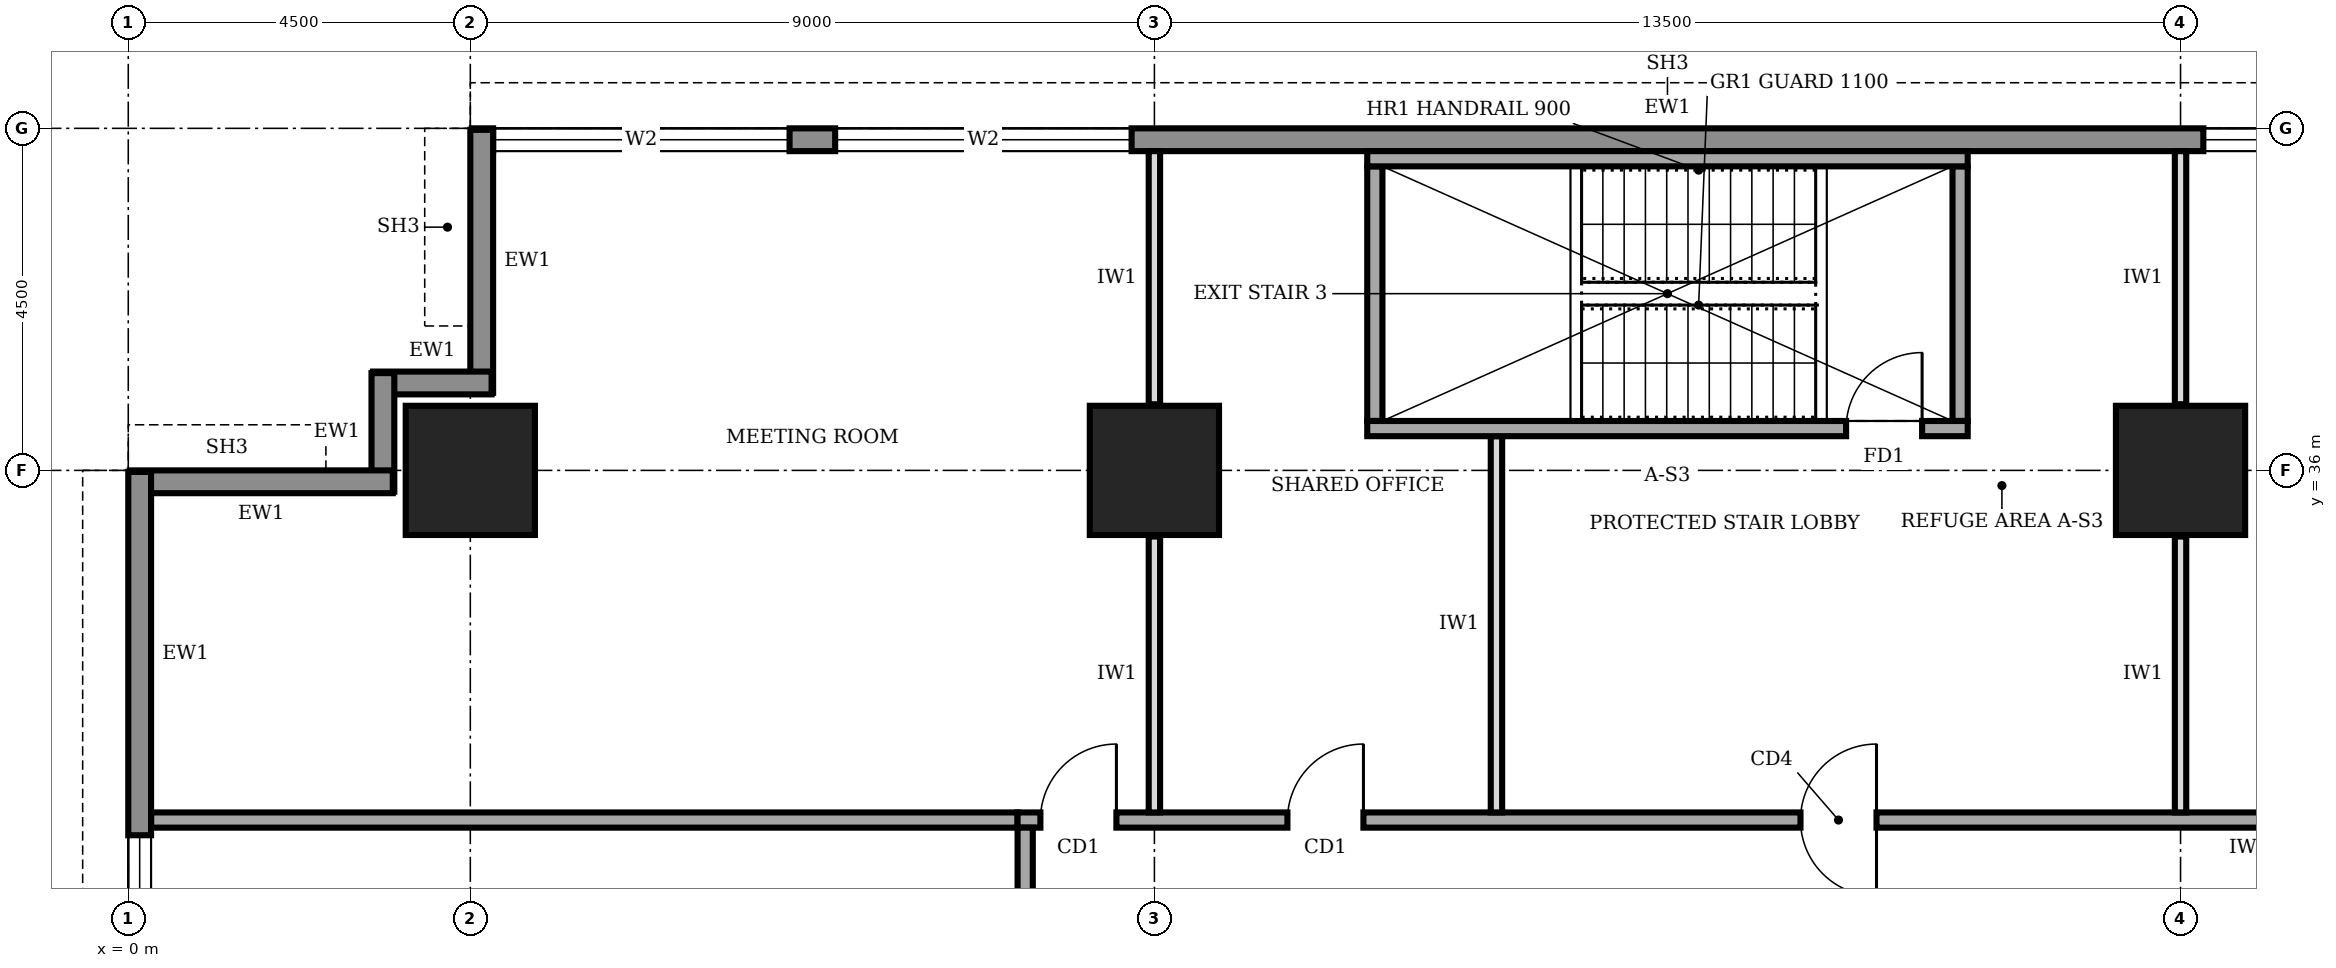
"""IFC4 building model, lengths in metres.
Left out: names, types, materials, properties, quantities, classifications, styles, units other than length and angle.
Written with IfcOpenShell. Run it as: python <this file> out.ifc"""

import sys

from ifc_helpers import new_model, si_unit, direction, frame, frame_2d, origin, origin_2d, place, context, subcontext, project, spatial, rectangle, extrude, element, fill, save


model = new_model("IFC4")
c1 = context("Model", 3, precision=1e-05, world=origin(), true_north=direction((0.0, 1.0)))
c2 = subcontext(c1, "Body", "Model", "MODEL_VIEW")
j1 = project(units=[si_unit("LENGTHUNIT", "METRE"), si_unit("PLANEANGLEUNIT", "RADIAN")], contexts=[c1])
p1 = place(None, origin())
s1 = spatial("IfcSite", under=j1, at=p1, CompositionType="ELEMENT")
p2 = place(p1, origin())
s2 = spatial("IfcBuilding", under=s1, at=p2, CompositionType="ELEMENT")
p3 = place(p2, frame((0.0, 0.0, 141.0)))
s3 = spatial("IfcBuildingStorey", under=s2, at=p3, CompositionType="ELEMENT", Elevation=141.0)
for number, where, z_axis, x_axis in (
    (1, (4.5, 36.0, 0.0), (0.0, 0.0, 1.0), (1.0, 0.0, 0.0)),
    (2, (13.5, 36.0, 0.0), (0.0, 0.0, 1.0), (1.0, 0.0, 0.0)),
    (3, (27.0, 36.0, 0.0), (0.0, 0.0, 1.0), (1.0, 0.0, 0.0)),
):
    element("IfcColumn", number, at=place(p3, frame(where, z_axis=z_axis, x_axis=x_axis)), inside=s3, PredefinedType="COLUMN", context=c2, shape_type="SweptSolid", body=[
        extrude(rectangle(XDim=1.7, YDim=1.7, at=origin_2d()), origin(), (0.0, 0.0, 1.0), 4.0),
    ])
p4 = place(p3, frame((35.98, 40.35, 0.0), z_axis=(0.0, 0.0, 1.0), x_axis=(-1.0, 0.0, 0.0)))
e4 = element("IfcWall", 4, at=p4, inside=s3, PredefinedType="STANDARD", context=c2, shape_type="SweptSolid", body=[
    extrude(rectangle(XDim=31.46, YDim=0.3, at=frame_2d((15.73, 0.0))), origin(), (0.0, 0.0, 1.0), 3.75),
])
p5 = place(p4, frame((27.28, 0.0, 0.6)))
e5 = element("IfcOpeningElement", 5, at=p5, cuts=e4, PredefinedType="OPENING", context=c2, shape_type="SweptSolid", body=[
    extrude(rectangle(XDim=3.9, YDim=2.6, at=frame_2d((1.95, 1.3))), frame((0.0, 0.16, 0.0), z_axis=(0.0, -1.0, 0.0), x_axis=(1.0, 0.0, 0.0)), (0.0, 0.0, 1.0), 0.32),
])
p6 = place(p4, frame((22.78, 0.0, 0.6)))
e6 = element("IfcOpeningElement", 6, at=p6, cuts=e4, PredefinedType="OPENING", context=c2, shape_type="SweptSolid", body=[
    extrude(rectangle(XDim=3.9, YDim=2.6, at=frame_2d((1.95, 1.3))), frame((0.0, 0.16, 0.0), z_axis=(0.0, -1.0, 0.0), x_axis=(1.0, 0.0, 0.0)), (0.0, 0.0, 1.0), 0.32),
])
p7 = place(p4, frame((4.78, 0.0, 0.6)))
e7 = element("IfcOpeningElement", 7, at=p7, cuts=e4, PredefinedType="OPENING", context=c2, shape_type="SweptSolid", body=[
    extrude(rectangle(XDim=3.9, YDim=2.6, at=frame_2d((1.95, 1.3))), frame((0.0, 0.16, 0.0), z_axis=(0.0, -1.0, 0.0), x_axis=(1.0, 0.0, 0.0)), (0.0, 0.0, 1.0), 0.32),
])
p8 = place(p3, frame((4.65, 40.48, 0.0), z_axis=(0.0, 0.0, 1.0), x_axis=(0.0, -1.0, 0.0)))
e8 = element("IfcWall", 8, at=p8, inside=s3, PredefinedType="STANDARD", context=c2, shape_type="SweptSolid", body=[
    extrude(rectangle(XDim=3.46, YDim=0.3, at=frame_2d((1.73, 0.0))), origin(), (0.0, 0.0, 1.0), 2.85),
])
for number, where, z_axis, x_axis in (
    (9, (4.78, 37.15, 0.0), (0.0, 0.0, 1.0), (-1.0, 0.0, 0.0)),
    (10, (3.35, 37.28, 0.0), (0.0, 0.0, 1.0), (0.0, -1.0, 0.0)),
):
    element("IfcWall", number, at=place(p3, frame(where, z_axis=z_axis, x_axis=x_axis)), inside=s3, PredefinedType="STANDARD", context=c2, shape_type="SweptSolid", body=[
        extrude(rectangle(XDim=1.56, YDim=0.3, at=frame_2d((0.78, 0.0))), origin(), (0.0, 0.0, 1.0), 3.75),
    ])
p9 = place(p3, frame((3.48, 35.85, 0.0), z_axis=(0.0, 0.0, 1.0), x_axis=(-1.0, 0.0, 0.0)))
e11 = element("IfcWall", 11, at=p9, inside=s3, PredefinedType="STANDARD", context=c2, shape_type="SweptSolid", body=[
    extrude(rectangle(XDim=3.46, YDim=0.3, at=frame_2d((1.73, 0.0))), origin(), (0.0, 0.0, 1.0), 2.85),
])
p10 = place(p3, frame((0.15, 35.98, 0.0), z_axis=(0.0, 0.0, 1.0), x_axis=(0.0, -1.0, 0.0)))
e12 = element("IfcWall", 12, at=p10, inside=s3, PredefinedType="STANDARD", context=c2, shape_type="SweptSolid", body=[
    extrude(rectangle(XDim=31.46, YDim=0.3, at=frame_2d((15.73, 0.0))), origin(), (0.0, 0.0, 1.0), 3.75),
])
p11 = place(p10, frame((27.28, 0.0, 0.6)))
e13 = element("IfcOpeningElement", 13, at=p11, cuts=e12, PredefinedType="OPENING", context=c2, shape_type="SweptSolid", body=[
    extrude(rectangle(XDim=3.9, YDim=2.6, at=frame_2d((1.95, 1.3))), frame((0.0, 0.16, 0.0), z_axis=(0.0, -1.0, 0.0), x_axis=(1.0, 0.0, 0.0)), (0.0, 0.0, 1.0), 0.32),
])
p12 = place(p10, frame((22.78, 0.0, 0.6)))
e14 = element("IfcOpeningElement", 14, at=p12, cuts=e12, PredefinedType="OPENING", context=c2, shape_type="SweptSolid", body=[
    extrude(rectangle(XDim=3.9, YDim=2.6, at=frame_2d((1.95, 1.3))), frame((0.0, 0.16, 0.0), z_axis=(0.0, -1.0, 0.0), x_axis=(1.0, 0.0, 0.0)), (0.0, 0.0, 1.0), 0.32),
])
p13 = place(p10, frame((18.28, 0.0, 0.6)))
e15 = element("IfcOpeningElement", 15, at=p13, cuts=e12, PredefinedType="OPENING", context=c2, shape_type="SweptSolid", body=[
    extrude(rectangle(XDim=3.9, YDim=2.6, at=frame_2d((1.95, 1.3))), frame((0.0, 0.16, 0.0), z_axis=(0.0, -1.0, 0.0), x_axis=(1.0, 0.0, 0.0)), (0.0, 0.0, 1.0), 0.32),
])
p14 = place(p10, frame((13.78, 0.0, 0.6)))
e16 = element("IfcOpeningElement", 16, at=p14, cuts=e12, PredefinedType="OPENING", context=c2, shape_type="SweptSolid", body=[
    extrude(rectangle(XDim=3.9, YDim=2.6, at=frame_2d((1.95, 1.3))), frame((0.0, 0.16, 0.0), z_axis=(0.0, -1.0, 0.0), x_axis=(1.0, 0.0, 0.0)), (0.0, 0.0, 1.0), 0.32),
])
p15 = place(p10, frame((9.28, 0.0, 0.6)))
e17 = element("IfcOpeningElement", 17, at=p15, cuts=e12, PredefinedType="OPENING", context=c2, shape_type="SweptSolid", body=[
    extrude(rectangle(XDim=3.9, YDim=2.6, at=frame_2d((1.95, 1.3))), frame((0.0, 0.16, 0.0), z_axis=(0.0, -1.0, 0.0), x_axis=(1.0, 0.0, 0.0)), (0.0, 0.0, 1.0), 0.32),
])
p16 = place(p10, frame((4.78, 0.0, 0.6)))
e18 = element("IfcOpeningElement", 18, at=p16, cuts=e12, PredefinedType="OPENING", context=c2, shape_type="SweptSolid", body=[
    extrude(rectangle(XDim=3.9, YDim=2.6, at=frame_2d((1.95, 1.3))), frame((0.0, 0.16, 0.0), z_axis=(0.0, -1.0, 0.0), x_axis=(1.0, 0.0, 0.0)), (0.0, 0.0, 1.0), 0.32),
])
p17 = place(p3, frame((40.2, 31.4, 0.0), z_axis=(0.0, 0.0, 1.0), x_axis=(-1.0, 0.0, 0.0)))
e19 = element("IfcWall", 19, at=p17, inside=s3, PredefinedType="SOLIDWALL", context=c2, shape_type="SweptSolid", body=[
    extrude(rectangle(XDim=28.5, YDim=0.2, at=frame_2d((14.25, 0.0))), origin(), (0.0, 0.0, 1.0), 3.75),
])
p18 = place(p17, frame((27.2, 0.0, 0.0)))
e20 = element("IfcOpeningElement", 20, at=p18, cuts=e19, PredefinedType="OPENING", context=c2, shape_type="SweptSolid", body=[
    extrude(rectangle(XDim=1.0, YDim=2.1, at=frame_2d((0.5, 1.05))), frame((0.0, 0.11, 0.0), z_axis=(0.0, -1.0, 0.0), x_axis=(1.0, 0.0, 0.0)), (0.0, 0.0, 1.0), 0.22),
])
p19 = place(p17, frame((23.95, 0.0, 0.0)))
e21 = element("IfcOpeningElement", 21, at=p19, cuts=e19, PredefinedType="OPENING", context=c2, shape_type="SweptSolid", body=[
    extrude(rectangle(XDim=1.0, YDim=2.1, at=frame_2d((0.5, 1.05))), frame((0.0, 0.11, 0.0), z_axis=(0.0, -1.0, 0.0), x_axis=(1.0, 0.0, 0.0)), (0.0, 0.0, 1.0), 0.22),
])
p20 = place(p17, frame((17.2, 0.0, 0.0)))
e22 = element("IfcOpeningElement", 22, at=p20, cuts=e19, PredefinedType="OPENING", context=c2, shape_type="SweptSolid", body=[
    extrude(rectangle(XDim=1.0, YDim=2.1, at=frame_2d((0.5, 1.05))), frame((0.0, 0.11, 0.0), z_axis=(0.0, -1.0, 0.0), x_axis=(1.0, 0.0, 0.0)), (0.0, 0.0, 1.0), 0.22),
])
p21 = place(p17, frame((5.6, 0.0, 0.0)))
e23 = element("IfcOpeningElement", 23, at=p21, cuts=e19, PredefinedType="OPENING", context=c2, shape_type="SweptSolid", body=[
    extrude(rectangle(XDim=1.8, YDim=2.1, at=frame_2d((0.9, 1.05))), frame((0.0, 0.11, 0.0), z_axis=(0.0, -1.0, 0.0), x_axis=(1.0, 0.0, 0.0)), (0.0, 0.0, 1.0), 0.22),
])
p22 = place(p3, frame((11.8, 31.3, 0.0), z_axis=(0.0, 0.0, 1.0), x_axis=(0.0, -1.0, 0.0)))
e24 = element("IfcWall", 24, at=p22, inside=s3, PredefinedType="SOLIDWALL", context=c2, shape_type="SweptSolid", body=[
    extrude(rectangle(XDim=22.3, YDim=0.2, at=frame_2d((11.15, 0.0))), origin(), (0.0, 0.0, 1.0), 3.75),
])
p23 = place(p22, frame((19.55, 0.0, 0.0)))
e25 = element("IfcOpeningElement", 25, at=p23, cuts=e24, PredefinedType="OPENING", context=c2, shape_type="SweptSolid", body=[
    extrude(rectangle(XDim=1.0, YDim=2.1, at=frame_2d((0.5, 1.05))), frame((0.0, 0.11, 0.0), z_axis=(0.0, -1.0, 0.0), x_axis=(1.0, 0.0, 0.0)), (0.0, 0.0, 1.0), 0.22),
])
p24 = place(p22, frame((16.15, 0.0, 0.0)))
e26 = element("IfcOpeningElement", 26, at=p24, cuts=e24, PredefinedType="OPENING", context=c2, shape_type="SweptSolid", body=[
    extrude(rectangle(XDim=0.9, YDim=2.1, at=frame_2d((0.45, 1.05))), frame((0.0, 0.11, 0.0), z_axis=(0.0, -1.0, 0.0), x_axis=(1.0, 0.0, 0.0)), (0.0, 0.0, 1.0), 0.22),
])
p25 = place(p22, frame((12.95, 0.0, 0.0)))
e27 = element("IfcOpeningElement", 27, at=p25, cuts=e24, PredefinedType="OPENING", context=c2, shape_type="SweptSolid", body=[
    extrude(rectangle(XDim=0.9, YDim=2.1, at=frame_2d((0.45, 1.05))), frame((0.0, 0.11, 0.0), z_axis=(0.0, -1.0, 0.0), x_axis=(1.0, 0.0, 0.0)), (0.0, 0.0, 1.0), 0.22),
])
p26 = place(p22, frame((7.4, 0.0, 0.0)))
e28 = element("IfcOpeningElement", 28, at=p26, cuts=e24, PredefinedType="OPENING", context=c2, shape_type="SweptSolid", body=[
    extrude(rectangle(XDim=0.9, YDim=2.1, at=frame_2d((0.45, 1.05))), frame((0.0, 0.11, 0.0), z_axis=(0.0, -1.0, 0.0), x_axis=(1.0, 0.0, 0.0)), (0.0, 0.0, 1.0), 0.22),
])
p27 = place(p22, frame((4.8, 0.0, 0.0)))
e29 = element("IfcOpeningElement", 29, at=p27, cuts=e24, PredefinedType="OPENING", context=c2, shape_type="SweptSolid", body=[
    extrude(rectangle(XDim=1.0, YDim=2.1, at=frame_2d((0.5, 1.05))), frame((0.0, 0.11, 0.0), z_axis=(0.0, -1.0, 0.0), x_axis=(1.0, 0.0, 0.0)), (0.0, 0.0, 1.0), 0.22),
])
p28 = place(p22, frame((9.9, 0.0, 0.0)))
e30 = element("IfcOpeningElement", 30, at=p28, cuts=e24, PredefinedType="OPENING", context=c2, shape_type="SweptSolid", body=[
    extrude(rectangle(XDim=1.0, YDim=2.1, at=frame_2d((0.5, 1.05))), frame((0.0, 0.11, 0.0), z_axis=(0.0, -1.0, 0.0), x_axis=(1.0, 0.0, 0.0)), (0.0, 0.0, 1.0), 0.22),
])
p29 = place(p22, frame((1.55, 0.0, 0.0)))
e31 = element("IfcOpeningElement", 31, at=p29, cuts=e24, PredefinedType="OPENING", context=c2, shape_type="SweptSolid", body=[
    extrude(rectangle(XDim=1.0, YDim=2.1, at=frame_2d((0.5, 1.05))), frame((0.0, 0.11, 0.0), z_axis=(0.0, -1.0, 0.0), x_axis=(1.0, 0.0, 0.0)), (0.0, 0.0, 1.0), 0.22),
])
p30 = place(p3, frame((0.3, 31.4, 0.0), z_axis=(0.0, 0.0, 1.0), x_axis=(1.0, 0.0, 0.0)))
e32 = element("IfcWall", 32, at=p30, inside=s3, PredefinedType="SOLIDWALL", context=c2, shape_type="SweptSolid", body=[
    extrude(rectangle(XDim=11.4, YDim=0.2, at=frame_2d((5.7, 0.0))), origin(), (0.0, 0.0, 1.0), 3.75),
])
p31 = place(p3, frame((13.5, 31.5, 0.0), z_axis=(0.0, 0.0, 1.0), x_axis=(0.0, 1.0, 0.0)))
e33 = element("IfcWall", 33, at=p31, inside=s3, PredefinedType="PARTITIONING", context=c2, shape_type="SweptSolid", body=[
    extrude(rectangle(XDim=3.63, YDim=0.15, at=frame_2d((1.815, 0.0))), origin(), (0.0, 0.0, 1.0), 2.85),
])
p32 = place(p3, frame((13.5, 36.87, 0.0), z_axis=(0.0, 0.0, 1.0), x_axis=(0.0, 1.0, 0.0)))
e34 = element("IfcWall", 34, at=p32, inside=s3, PredefinedType="PARTITIONING", context=c2, shape_type="SweptSolid", body=[
    extrude(rectangle(XDim=3.33, YDim=0.15, at=frame_2d((1.665, 0.0))), origin(), (0.0, 0.0, 1.0), 2.85),
])
p33 = place(p3, frame((18.0, 31.5, 0.0), z_axis=(0.0, 0.0, 1.0), x_axis=(0.0, 1.0, 0.0)))
e35 = element("IfcWall", 35, at=p33, inside=s3, PredefinedType="PARTITIONING", context=c2, shape_type="SweptSolid", body=[
    extrude(rectangle(XDim=4.95, YDim=0.15, at=frame_2d((2.475, 0.0))), origin(), (0.0, 0.0, 1.0), 3.75),
])
p34 = place(p3, frame((27.0, 31.5, 0.0), z_axis=(0.0, 0.0, 1.0), x_axis=(0.0, 1.0, 0.0)))
e36 = element("IfcWall", 36, at=p34, inside=s3, PredefinedType="PARTITIONING", context=c2, shape_type="SweptSolid", body=[
    extrude(rectangle(XDim=3.63, YDim=0.15, at=frame_2d((1.815, 0.0))), origin(), (0.0, 0.0, 1.0), 2.85),
])
p35 = place(p3, frame((27.0, 36.87, 0.0), z_axis=(0.0, 0.0, 1.0), x_axis=(0.0, 1.0, 0.0)))
e37 = element("IfcWall", 37, at=p35, inside=s3, PredefinedType="PARTITIONING", context=c2, shape_type="SweptSolid", body=[
    extrude(rectangle(XDim=3.33, YDim=0.15, at=frame_2d((1.665, 0.0))), origin(), (0.0, 0.0, 1.0), 2.85),
])
p36 = place(p3, frame((16.3, 36.55, 0.0), z_axis=(0.0, 0.0, 1.0), x_axis=(1.0, 0.0, 0.0)))
e38 = element("IfcWall", 38, at=p36, inside=s3, PredefinedType="SOLIDWALL", context=c2, shape_type="SweptSolid", body=[
    extrude(rectangle(XDim=7.9, YDim=0.2, at=frame_2d((3.95, 0.0))), origin(), (0.0, 0.0, 1.0), 3.75),
])
p37 = place(p36, frame((6.3, 0.0, 0.0)))
e39 = element("IfcOpeningElement", 39, at=p37, cuts=e38, PredefinedType="OPENING", context=c2, shape_type="SweptSolid", body=[
    extrude(rectangle(XDim=1.0, YDim=2.1, at=frame_2d((0.5, 1.05))), frame((0.0, 0.11, 0.0), z_axis=(0.0, -1.0, 0.0), x_axis=(1.0, 0.0, 0.0)), (0.0, 0.0, 1.0), 0.22),
])
p38 = place(p3, frame((16.3, 40.1, 0.0), z_axis=(0.0, 0.0, 1.0), x_axis=(1.0, 0.0, 0.0)))
e40 = element("IfcWall", 40, at=p38, inside=s3, PredefinedType="SOLIDWALL", context=c2, shape_type="SweptSolid", body=[
    extrude(rectangle(XDim=7.9, YDim=0.2, at=frame_2d((3.95, 0.0))), origin(), (0.0, 0.0, 1.0), 3.75),
])
for number, where, z_axis, x_axis in (
    (41, (16.4, 36.65, 0.0), (0.0, 0.0, 1.0), (0.0, 1.0, 0.0)),
    (42, (24.1, 36.65, 0.0), (0.0, 0.0, 1.0), (0.0, 1.0, 0.0)),
):
    element("IfcWall", number, at=place(p3, frame(where, z_axis=z_axis, x_axis=x_axis)), inside=s3, PredefinedType="SOLIDWALL", context=c2, shape_type="SweptSolid", body=[
        extrude(rectangle(XDim=3.35, YDim=0.2, at=frame_2d((1.675, 0.0))), origin(), (0.0, 0.0, 1.0), 3.75),
    ])
p39 = place(p5, origin())
e43 = element("IfcWindow", 43, at=p39, inside=s3, PartitioningType="SINGLE_PANEL", PredefinedType="WINDOW", context=c2, shape_type="SweptSolid", body=[
    extrude(rectangle(XDim=3.9, YDim=2.6, at=frame_2d((1.95, 1.3))), frame((0.0, 0.03, 0.0), z_axis=(0.0, -1.0, 0.0), x_axis=(1.0, 0.0, 0.0)), (0.0, 0.0, 1.0), 0.06),
])
fill(e5, e43)
p40 = place(p6, origin())
e44 = element("IfcWindow", 44, at=p40, inside=s3, PartitioningType="SINGLE_PANEL", PredefinedType="WINDOW", context=c2, shape_type="SweptSolid", body=[
    extrude(rectangle(XDim=3.9, YDim=2.6, at=frame_2d((1.95, 1.3))), frame((0.0, 0.03, 0.0), z_axis=(0.0, -1.0, 0.0), x_axis=(1.0, 0.0, 0.0)), (0.0, 0.0, 1.0), 0.06),
])
fill(e6, e44)
p41 = place(p7, origin())
e45 = element("IfcWindow", 45, at=p41, inside=s3, PartitioningType="SINGLE_PANEL", PredefinedType="WINDOW", context=c2, shape_type="SweptSolid", body=[
    extrude(rectangle(XDim=3.9, YDim=2.6, at=frame_2d((1.95, 1.3))), frame((0.0, 0.03, 0.0), z_axis=(0.0, -1.0, 0.0), x_axis=(1.0, 0.0, 0.0)), (0.0, 0.0, 1.0), 0.06),
])
fill(e7, e45)
p42 = place(p16, origin())
e46 = element("IfcWindow", 46, at=p42, inside=s3, PartitioningType="SINGLE_PANEL", PredefinedType="WINDOW", context=c2, shape_type="SweptSolid", body=[
    extrude(rectangle(XDim=3.9, YDim=2.6, at=frame_2d((1.95, 1.3))), frame((0.0, 0.03, 0.0), z_axis=(0.0, -1.0, 0.0), x_axis=(1.0, 0.0, 0.0)), (0.0, 0.0, 1.0), 0.06),
])
fill(e18, e46)
p43 = place(p18, frame((1.0, 0.0, 0.0), z_axis=(0.0, 0.0, 1.0), x_axis=(-1.0, 0.0, 0.0)))
e47 = element("IfcDoor", 47, at=p43, inside=s3, OperationType="SINGLE_SWING_RIGHT", PredefinedType="DOOR", context=c2, shape_type="SweptSolid", body=[
    extrude(rectangle(XDim=1.0, YDim=2.1, at=frame_2d((0.5, 1.05))), frame((0.0, 0.025, 0.0), z_axis=(0.0, -1.0, 0.0), x_axis=(1.0, 0.0, 0.0)), (0.0, 0.0, 1.0), 0.05),
])
fill(e20, e47)
p44 = place(p19, frame((1.0, 0.0, 0.0), z_axis=(0.0, 0.0, 1.0), x_axis=(-1.0, 0.0, 0.0)))
e48 = element("IfcDoor", 48, at=p44, inside=s3, OperationType="SINGLE_SWING_RIGHT", PredefinedType="DOOR", context=c2, shape_type="SweptSolid", body=[
    extrude(rectangle(XDim=1.0, YDim=2.1, at=frame_2d((0.5, 1.05))), frame((0.0, 0.025, 0.0), z_axis=(0.0, -1.0, 0.0), x_axis=(1.0, 0.0, 0.0)), (0.0, 0.0, 1.0), 0.05),
])
fill(e21, e48)
p45 = place(p20, origin())
e49 = element("IfcDoor", 49, at=p45, inside=s3, OperationType="DOUBLE_SWING_LEFT", PredefinedType="DOOR", context=c2, shape_type="SweptSolid", body=[
    extrude(rectangle(XDim=1.0, YDim=2.1, at=frame_2d((0.5, 1.05))), frame((0.0, 0.025, 0.0), z_axis=(0.0, -1.0, 0.0), x_axis=(1.0, 0.0, 0.0)), (0.0, 0.0, 1.0), 0.05),
])
fill(e22, e49)
p46 = place(p37, origin())
e50 = element("IfcDoor", 50, at=p46, inside=s3, OperationType="SINGLE_SWING_RIGHT", PredefinedType="DOOR", context=c2, shape_type="SweptSolid", body=[
    extrude(rectangle(XDim=1.0, YDim=2.1, at=frame_2d((0.5, 1.05))), frame((0.0, 0.025, 0.0), z_axis=(0.0, -1.0, 0.0), x_axis=(1.0, 0.0, 0.0)), (0.0, 0.0, 1.0), 0.05),
])
fill(e39, e50)
save(model, sys.argv[1])
